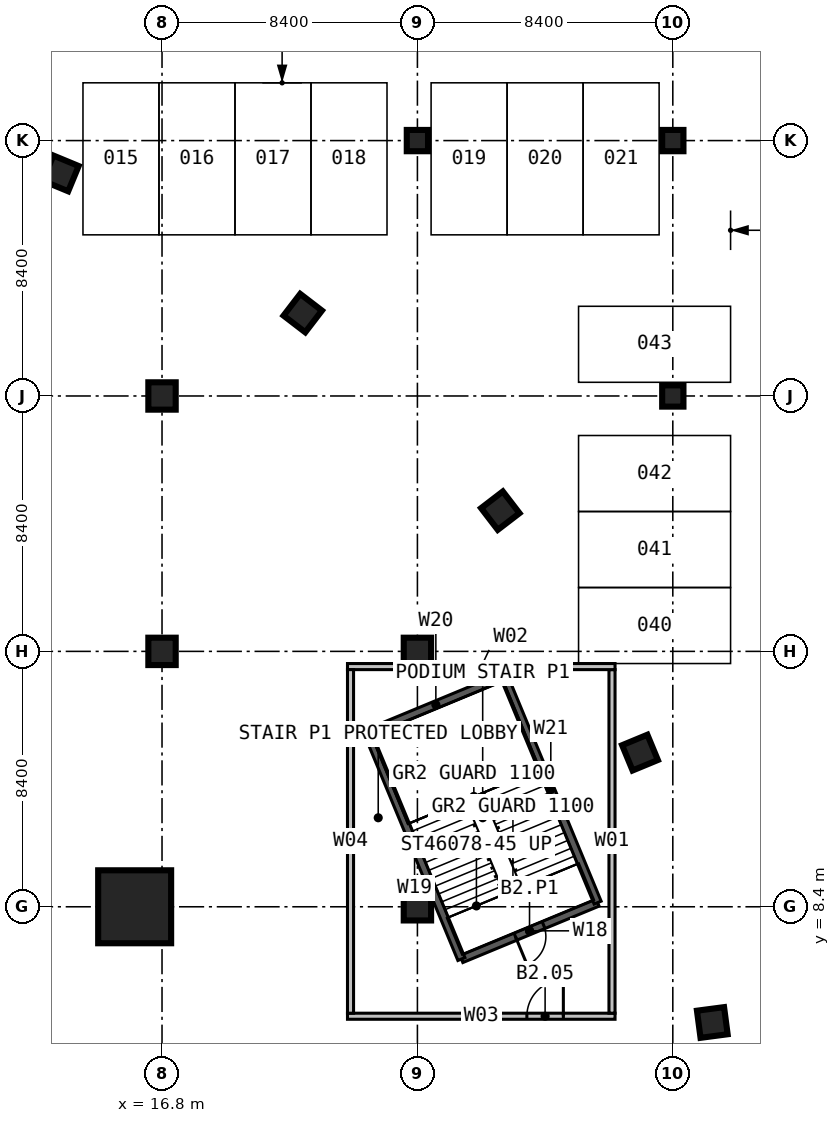
"""IFC4 building model, lengths in metres.
Left out: names, types, materials, properties, quantities, classifications, styles, units other than length and angle.
Written with IfcOpenShell. Run it as: python <this file> out.ifc"""

import sys

from ifc_helpers import new_model, si_unit, direction, frame, frame_2d, origin, origin_2d, place, context, subcontext, project, spatial, rectangle, extrude, element, fill, save


model = new_model("IFC4")
c1 = context("Model", 3, precision=1e-05, world=origin(), true_north=direction((0.0, 1.0)))
c2 = subcontext(c1, "Body", "Model", "MODEL_VIEW")
j1 = project(units=[si_unit("LENGTHUNIT", "METRE"), si_unit("PLANEANGLEUNIT", "RADIAN")], contexts=[c1])
p1 = place(None, origin())
s1 = spatial("IfcSite", under=j1, at=p1, CompositionType="ELEMENT")
p2 = place(p1, origin())
s2 = spatial("IfcBuilding", under=s1, at=p2, CompositionType="ELEMENT")
p3 = place(p2, frame((0.0, 0.0, -9.0)))
s3 = spatial("IfcBuildingStorey", under=s2, at=p3, CompositionType="ELEMENT", Elevation=-9.0)
p4 = place(p3, frame((15.9, 8.4, 0.0), z_axis=(0.0, 0.0, 1.0), x_axis=(1.0, 0.0, 0.0)))
e1 = element("IfcColumn", 1, at=p4, inside=s3, PredefinedType="COLUMN", context=c2, shape_type="SweptSolid", body=[
    extrude(rectangle(XDim=2.4, YDim=2.4, at=origin_2d()), origin(), (0.0, 0.0, 1.0), 4.5),
])
for number, where, z_axis, x_axis in (
    (2, (16.8, 16.8, 0.0), (0.0, 0.0, 1.0), (1.0, 0.0, 0.0)),
    (3, (16.8, 25.2, 0.0), (0.0, 0.0, 1.0), (1.0, 0.0, 0.0)),
    (4, (25.2, 8.4, 0.0), (0.0, 0.0, 1.0), (1.0, 0.0, 0.0)),
    (5, (25.2, 16.8, 0.0), (0.0, 0.0, 1.0), (1.0, 0.0, 0.0)),
):
    element("IfcColumn", number, at=place(p3, frame(where, z_axis=z_axis, x_axis=x_axis)), inside=s3, PredefinedType="COLUMN", context=c2, shape_type="SweptSolid", body=[
        extrude(rectangle(XDim=0.9, YDim=0.9, at=origin_2d()), origin(), (0.0, 0.0, 1.0), 4.5),
    ])
for number, where, z_axis, x_axis in (
    (6, (25.2, 33.6, 0.0), (0.0, 0.0, 1.0), (1.0, 0.0, 0.0)),
    (7, (33.6, 25.2, 0.0), (0.0, 0.0, 1.0), (1.0, 0.0, 0.0)),
    (8, (33.6, 33.6, 0.0), (0.0, 0.0, 1.0), (1.0, 0.0, 0.0)),
):
    element("IfcColumn", number, at=place(p3, frame(where, z_axis=z_axis, x_axis=x_axis)), inside=s3, PredefinedType="COLUMN", context=c2, shape_type="SweptSolid", body=[
        extrude(rectangle(XDim=0.7, YDim=0.7, at=origin_2d()), origin(), (0.0, 0.0, 1.0), 4.5),
    ])
for number, where, z_axis, x_axis in (
    (9, (34.899, 4.594, 0.0), (0.0, 0.0, 1.0), (0.991, 0.131, 0.0)),
    (10, (32.521, 13.47, 0.0), (0.0, 0.0, 1.0), (0.924, 0.383, 0.0)),
    (11, (27.926, 21.428, 0.0), (0.0, 0.0, 1.0), (0.793, 0.609, 0.0)),
    (12, (21.428, 27.926, 0.0), (0.0, 0.0, 1.0), (0.609, 0.793, 0.0)),
    (13, (13.47, 32.521, 0.0), (0.0, 0.0, 1.0), (0.383, 0.924, 0.0)),
):
    element("IfcColumn", number, at=place(p3, frame(where, z_axis=z_axis, x_axis=x_axis)), inside=s3, PredefinedType="COLUMN", context=c2, shape_type="SweptSolid", body=[
        extrude(rectangle(XDim=0.9, YDim=0.9, at=origin_2d()), origin(), (0.0, 0.0, 1.0), 4.5),
    ])
p5 = place(p3, frame((31.127, 8.537, 0.0), z_axis=(0.0, 0.0, 1.0), x_axis=(-0.923880627248, -0.382680789426, 0.0)))
e14 = element("IfcWall", 14, at=p5, inside=s3, PredefinedType="SOLIDWALL", context=c2, shape_type="SweptSolid", body=[
    extrude(rectangle(XDim=4.85, YDim=0.25, at=frame_2d((2.425, 0.0))), origin(), (0.0, 0.0, 1.0), 4.5),
])
p6 = place(p5, frame((1.925, 0.0, 0.0)))
e15 = element("IfcOpeningElement", 15, at=p6, cuts=e14, PredefinedType="OPENING", context=c2, shape_type="SweptSolid", body=[
    extrude(rectangle(XDim=1.0, YDim=2.2, at=frame_2d((0.5, 1.1))), frame((0.0, 0.135, 0.0), z_axis=(0.0, -1.0, 0.0), x_axis=(1.0, 0.0, 0.0)), (0.0, 0.0, 1.0), 0.27),
])
p7 = place(p3, frame((26.647, 6.681, 0.0), z_axis=(0.0, 0.0, 1.0), x_axis=(-0.382689294869, 0.923877104161, 0.0)))
e16 = element("IfcWall", 16, at=p7, inside=s3, PredefinedType="SOLIDWALL", context=c2, shape_type="SweptSolid", body=[
    extrude(rectangle(XDim=8.05, YDim=0.25, at=frame_2d((4.025, 0.0))), origin(), (0.0, 0.0, 1.0), 4.5),
])
p8 = place(p3, frame((23.566, 14.118, 0.0), z_axis=(0.0, 0.0, 1.0), x_axis=(0.923862828997, 0.382723755727, 0.0)))
e17 = element("IfcWall", 17, at=p8, inside=s3, PredefinedType="SOLIDWALL", context=c2, shape_type="SweptSolid", body=[
    extrude(rectangle(XDim=4.85, YDim=0.25, at=frame_2d((2.425, 0.0))), origin(), (0.0, 0.0, 1.0), 4.5),
])
p9 = place(p3, frame((28.047, 15.974, 0.0), z_axis=(0.0, 0.0, 1.0), x_axis=(0.382678572144, -0.923881545666, 0.0)))
e18 = element("IfcWall", 18, at=p9, inside=s3, PredefinedType="SOLIDWALL", context=c2, shape_type="SweptSolid", body=[
    extrude(rectangle(XDim=8.05, YDim=0.25, at=frame_2d((4.025, 0.0))), origin(), (0.0, 0.0, 1.0), 4.5),
])
p10 = place(p3, frame((22.9, 4.8, 0.0), z_axis=(0.0, 0.0, 1.0), x_axis=(1.0, 0.0, 0.0)))
e19 = element("IfcWall", 19, at=p10, inside=s3, PredefinedType="PARTITIONING", context=c2, shape_type="SweptSolid", body=[
    extrude(rectangle(XDim=8.8, YDim=0.2, at=frame_2d((4.4, 0.0))), origin(), (0.0, 0.0, 1.0), 4.2),
])
p11 = place(p10, frame((5.9, 0.0, 0.0)))
e20 = element("IfcOpeningElement", 20, at=p11, cuts=e19, PredefinedType="OPENING", context=c2, shape_type="SweptSolid", body=[
    extrude(rectangle(XDim=1.2, YDim=2.2, at=frame_2d((0.6, 1.1))), frame((0.0, 0.11, 0.0), z_axis=(0.0, -1.0, 0.0), x_axis=(1.0, 0.0, 0.0)), (0.0, 0.0, 1.0), 0.22),
])
p12 = place(p3, frame((31.6, 4.9, 0.0), z_axis=(0.0, 0.0, 1.0), x_axis=(0.0, 1.0, 0.0)))
e21 = element("IfcWall", 21, at=p12, inside=s3, PredefinedType="PARTITIONING", context=c2, shape_type="SweptSolid", body=[
    extrude(rectangle(XDim=11.3, YDim=0.2, at=frame_2d((5.65, 0.0))), origin(), (0.0, 0.0, 1.0), 4.2),
])
p13 = place(p3, frame((31.7, 16.3, 0.0), z_axis=(0.0, 0.0, 1.0), x_axis=(-1.0, 0.0, 0.0)))
e22 = element("IfcWall", 22, at=p13, inside=s3, PredefinedType="PARTITIONING", context=c2, shape_type="SweptSolid", body=[
    extrude(rectangle(XDim=8.8, YDim=0.2, at=frame_2d((4.4, 0.0))), origin(), (0.0, 0.0, 1.0), 4.2),
])
p14 = place(p3, frame((23.0, 16.2, 0.0), z_axis=(0.0, 0.0, 1.0), x_axis=(0.0, -1.0, 0.0)))
e23 = element("IfcWall", 23, at=p14, inside=s3, PredefinedType="PARTITIONING", context=c2, shape_type="SweptSolid", body=[
    extrude(rectangle(XDim=11.3, YDim=0.2, at=frame_2d((5.65, 0.0))), origin(), (0.0, 0.0, 1.0), 4.2),
])
p15 = place(p6, origin())
e24 = element("IfcDoor", 24, at=p15, inside=s3, OperationType="SINGLE_SWING_RIGHT", PredefinedType="DOOR", context=c2, shape_type="SweptSolid", body=[
    extrude(rectangle(XDim=1.0, YDim=2.2, at=frame_2d((0.5, 1.1))), frame((0.0, 0.025, 0.0), z_axis=(0.0, -1.0, 0.0), x_axis=(1.0, 0.0, 0.0)), (0.0, 0.0, 1.0), 0.05),
])
fill(e15, e24)
p16 = place(p11, origin())
e25 = element("IfcDoor", 25, at=p16, inside=s3, OperationType="SINGLE_SWING_RIGHT", PredefinedType="DOOR", context=c2, shape_type="SweptSolid", body=[
    extrude(rectangle(XDim=1.2, YDim=2.2, at=frame_2d((0.6, 1.1))), frame((0.0, 0.025, 0.0), z_axis=(0.0, -1.0, 0.0), x_axis=(1.0, 0.0, 0.0)), (0.0, 0.0, 1.0), 0.05),
])
fill(e20, e25)
save(model, sys.argv[1])
